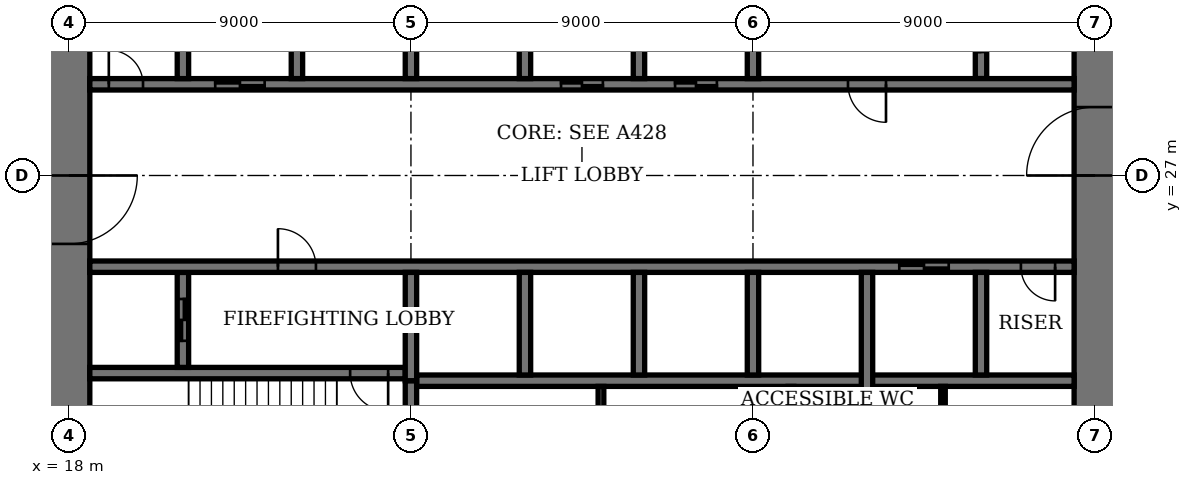
"""IFC4 building model, lengths in metres.
Left out: names, types, materials, properties, quantities, classifications, styles, units other than length and angle.
Written with IfcOpenShell. Run it as: python <this file> out.ifc"""

import sys

from ifc_helpers import new_model, si_unit, direction, frame, frame_2d, origin, place, context, subcontext, project, spatial, rectangle, extrude, element, fill, save


model = new_model("IFC4")
c1 = context("Model", 3, precision=1e-05, world=origin(), true_north=direction((0.0, 1.0)))
c2 = subcontext(c1, "Body", "Model", "MODEL_VIEW")
j1 = project(units=[si_unit("LENGTHUNIT", "METRE"), si_unit("PLANEANGLEUNIT", "RADIAN")], contexts=[c1])
p1 = place(None, origin())
s1 = spatial("IfcSite", under=j1, at=p1, CompositionType="ELEMENT")
p2 = place(p1, origin())
s2 = spatial("IfcBuilding", under=s1, at=p2, CompositionType="ELEMENT")
p3 = place(p2, frame((0.0, 0.0, 149.0)))
s3 = spatial("IfcBuildingStorey", under=s2, at=p3, CompositionType="ELEMENT", Elevation=149.0)
p4 = place(p3, frame((18.0, 35.45, 0.0), z_axis=(0.0, 0.0, 1.0), x_axis=(0.0, -1.0, 0.0)))
e1 = element("IfcWall", 1, at=p4, inside=s3, PredefinedType="SHEAR", context=c2, shape_type="SweptSolid", body=[
    extrude(rectangle(XDim=16.9, YDim=1.1, at=frame_2d((8.45, 0.0))), origin(), (0.0, 0.0, 1.0), 4.0),
])
p5 = place(p4, frame((8.45, 0.0, 0.0)))
e2 = element("IfcOpeningElement", 2, at=p5, cuts=e1, PredefinedType="OPENING", context=c2, shape_type="SweptSolid", body=[
    extrude(rectangle(XDim=1.8, YDim=2.4, at=frame_2d((0.9, 1.2))), frame((0.0, 0.56, 0.0), z_axis=(0.0, -1.0, 0.0), x_axis=(1.0, 0.0, 0.0)), (0.0, 0.0, 1.0), 1.12),
])
p6 = place(p3, frame((45.0, 18.55, 0.0), z_axis=(0.0, 0.0, 1.0), x_axis=(0.0, 1.0, 0.0)))
e3 = element("IfcWall", 3, at=p6, inside=s3, PredefinedType="SHEAR", context=c2, shape_type="SweptSolid", body=[
    extrude(rectangle(XDim=16.9, YDim=1.1, at=frame_2d((8.45, 0.0))), origin(), (0.0, 0.0, 1.0), 4.0),
])
p7 = place(p6, frame((8.45, 0.0, 0.0)))
e4 = element("IfcOpeningElement", 4, at=p7, cuts=e3, PredefinedType="OPENING", context=c2, shape_type="SweptSolid", body=[
    extrude(rectangle(XDim=1.8, YDim=2.4, at=frame_2d((0.9, 1.2))), frame((0.0, 0.56, 0.0), z_axis=(0.0, -1.0, 0.0), x_axis=(1.0, 0.0, 0.0)), (0.0, 0.0, 1.0), 1.12),
])
p8 = place(p3, frame((18.55, 21.8, 0.0), z_axis=(0.0, 0.0, 1.0), x_axis=(1.0, 0.0, 0.0)))
e5 = element("IfcWall", 5, at=p8, inside=s3, PredefinedType="SHEAR", context=c2, shape_type="SweptSolid", body=[
    extrude(rectangle(XDim=8.3, YDim=0.3, at=frame_2d((4.15, 0.0))), origin(), (0.0, 0.0, 1.0), 4.0),
])
p9 = place(p8, frame((6.85, 0.0, 0.0)))
e6 = element("IfcOpeningElement", 6, at=p9, cuts=e5, PredefinedType="OPENING", context=c2, shape_type="SweptSolid", body=[
    extrude(rectangle(XDim=1.0, YDim=2.4, at=frame_2d((0.5, 1.2))), frame((0.0, 0.16, 0.0), z_axis=(0.0, -1.0, 0.0), x_axis=(1.0, 0.0, 0.0)), (0.0, 0.0, 1.0), 0.32),
])
p10 = place(p3, frame((27.0, 18.55, 0.0), z_axis=(0.0, 0.0, 1.0), x_axis=(0.0, 1.0, 0.0)))
e7 = element("IfcWall", 7, at=p10, inside=s3, PredefinedType="SHEAR", context=c2, shape_type="SweptSolid", body=[
    extrude(rectangle(XDim=3.05, YDim=0.3, at=frame_2d((1.525, 0.0))), origin(), (0.0, 0.0, 1.0), 4.0),
])
p11 = place(p3, frame((21.0, 21.95, 0.0), z_axis=(0.0, 0.0, 1.0), x_axis=(0.0, 1.0, 0.0)))
e8 = element("IfcWall", 8, at=p11, inside=s3, PredefinedType="SHEAR", context=c2, shape_type="SweptSolid", body=[
    extrude(rectangle(XDim=2.5, YDim=0.3, at=frame_2d((1.25, 0.0))), origin(), (0.0, 0.0, 1.0), 4.0),
])
p12 = place(p11, frame((0.7, 0.0, 0.0)))
e9 = element("IfcOpeningElement", 9, at=p12, cuts=e8, PredefinedType="OPENING", context=c2, shape_type="SweptSolid", body=[
    extrude(rectangle(XDim=1.1, YDim=2.4, at=frame_2d((0.55, 1.2))), frame((0.0, 0.16, 0.0), z_axis=(0.0, -1.0, 0.0), x_axis=(1.0, 0.0, 0.0)), (0.0, 0.0, 1.0), 0.32),
])
p13 = place(p3, frame((42.0, 29.55, 0.0), z_axis=(0.0, 0.0, 1.0), x_axis=(0.0, 1.0, 0.0)))
e10 = element("IfcWall", 10, at=p13, inside=s3, PredefinedType="SHEAR", context=c2, shape_type="SweptSolid", body=[
    extrude(rectangle(XDim=2.5, YDim=0.3, at=frame_2d((1.25, 0.0))), origin(), (0.0, 0.0, 1.0), 4.0),
])
p14 = place(p13, frame((0.7, 0.0, 0.0)))
e11 = element("IfcOpeningElement", 11, at=p14, cuts=e10, PredefinedType="OPENING", context=c2, shape_type="SweptSolid", body=[
    extrude(rectangle(XDim=1.1, YDim=2.4, at=frame_2d((0.55, 1.2))), frame((0.0, 0.16, 0.0), z_axis=(0.0, -1.0, 0.0), x_axis=(1.0, 0.0, 0.0)), (0.0, 0.0, 1.0), 0.32),
])
p15 = place(p3, frame((18.55, 24.6, 0.0), z_axis=(0.0, 0.0, 1.0), x_axis=(1.0, 0.0, 0.0)))
e12 = element("IfcWall", 12, at=p15, inside=s3, PredefinedType="SHEAR", context=c2, shape_type="SweptSolid", body=[
    extrude(rectangle(XDim=25.9, YDim=0.3, at=frame_2d((12.95, 0.0))), origin(), (0.0, 0.0, 1.0), 4.0),
])
p16 = place(p15, frame((4.95, 0.0, 0.0)))
e13 = element("IfcOpeningElement", 13, at=p16, cuts=e12, PredefinedType="OPENING", context=c2, shape_type="SweptSolid", body=[
    extrude(rectangle(XDim=1.0, YDim=2.4, at=frame_2d((0.5, 1.2))), frame((0.0, 0.16, 0.0), z_axis=(0.0, -1.0, 0.0), x_axis=(1.0, 0.0, 0.0)), (0.0, 0.0, 1.0), 0.32),
])
p17 = place(p15, frame((24.5, 0.0, 0.0)))
e14 = element("IfcOpeningElement", 14, at=p17, cuts=e12, PredefinedType="OPENING", context=c2, shape_type="SweptSolid", body=[
    extrude(rectangle(XDim=0.9, YDim=2.1, at=frame_2d((0.45, 1.05))), frame((0.0, 0.16, 0.0), z_axis=(0.0, -1.0, 0.0), x_axis=(1.0, 0.0, 0.0)), (0.0, 0.0, 1.0), 0.32),
])
p18 = place(p15, frame((21.3, 0.0, 0.0)))
e15 = element("IfcOpeningElement", 15, at=p18, cuts=e12, PredefinedType="OPENING", context=c2, shape_type="SweptSolid", body=[
    extrude(rectangle(XDim=1.3, YDim=2.4, at=frame_2d((0.65, 1.2))), frame((0.0, 0.16, 0.0), z_axis=(0.0, -1.0, 0.0), x_axis=(1.0, 0.0, 0.0)), (0.0, 0.0, 1.0), 0.32),
])
p19 = place(p3, frame((18.55, 29.4, 0.0), z_axis=(0.0, 0.0, 1.0), x_axis=(1.0, 0.0, 0.0)))
e16 = element("IfcWall", 16, at=p19, inside=s3, PredefinedType="SHEAR", context=c2, shape_type="SweptSolid", body=[
    extrude(rectangle(XDim=25.9, YDim=0.3, at=frame_2d((12.95, 0.0))), origin(), (0.0, 0.0, 1.0), 4.0),
])
p20 = place(p19, frame((19.95, 0.0, 0.0)))
e17 = element("IfcOpeningElement", 17, at=p20, cuts=e16, PredefinedType="OPENING", context=c2, shape_type="SweptSolid", body=[
    extrude(rectangle(XDim=1.0, YDim=2.4, at=frame_2d((0.5, 1.2))), frame((0.0, 0.16, 0.0), z_axis=(0.0, -1.0, 0.0), x_axis=(1.0, 0.0, 0.0)), (0.0, 0.0, 1.0), 0.32),
])
p21 = place(p19, frame((0.5, 0.0, 0.0)))
e18 = element("IfcOpeningElement", 18, at=p21, cuts=e16, PredefinedType="OPENING", context=c2, shape_type="SweptSolid", body=[
    extrude(rectangle(XDim=0.9, YDim=2.1, at=frame_2d((0.45, 1.05))), frame((0.0, 0.16, 0.0), z_axis=(0.0, -1.0, 0.0), x_axis=(1.0, 0.0, 0.0)), (0.0, 0.0, 1.0), 0.32),
])
p22 = place(p19, frame((15.4, 0.0, 0.0)))
e19 = element("IfcOpeningElement", 19, at=p22, cuts=e16, PredefinedType="OPENING", context=c2, shape_type="SweptSolid", body=[
    extrude(rectangle(XDim=1.1, YDim=2.4, at=frame_2d((0.55, 1.2))), frame((0.0, 0.16, 0.0), z_axis=(0.0, -1.0, 0.0), x_axis=(1.0, 0.0, 0.0)), (0.0, 0.0, 1.0), 0.32),
])
p23 = place(p19, frame((12.4, 0.0, 0.0)))
e20 = element("IfcOpeningElement", 20, at=p23, cuts=e16, PredefinedType="OPENING", context=c2, shape_type="SweptSolid", body=[
    extrude(rectangle(XDim=1.1, YDim=2.4, at=frame_2d((0.55, 1.2))), frame((0.0, 0.16, 0.0), z_axis=(0.0, -1.0, 0.0), x_axis=(1.0, 0.0, 0.0)), (0.0, 0.0, 1.0), 0.32),
])
p24 = place(p19, frame((3.3, 0.0, 0.0)))
e21 = element("IfcOpeningElement", 21, at=p24, cuts=e16, PredefinedType="OPENING", context=c2, shape_type="SweptSolid", body=[
    extrude(rectangle(XDim=1.3, YDim=2.4, at=frame_2d((0.65, 1.2))), frame((0.0, 0.16, 0.0), z_axis=(0.0, -1.0, 0.0), x_axis=(1.0, 0.0, 0.0)), (0.0, 0.0, 1.0), 0.32),
])
p25 = place(p3, frame((27.15, 21.6, 0.0), z_axis=(0.0, 0.0, 1.0), x_axis=(1.0, 0.0, 0.0)))
e22 = element("IfcWall", 22, at=p25, inside=s3, PredefinedType="SHEAR", context=c2, shape_type="SweptSolid", body=[
    extrude(rectangle(XDim=17.3, YDim=0.3, at=frame_2d((8.65, 0.0))), origin(), (0.0, 0.0, 1.0), 4.0),
])
for number, where, z_axis, x_axis in (
    (23, (30.0, 21.75, 0.0), (0.0, 0.0, 1.0), (0.0, 1.0, 0.0)),
    (24, (33.0, 29.55, 0.0), (0.0, 0.0, 1.0), (0.0, 1.0, 0.0)),
    (25, (33.0, 21.75, 0.0), (0.0, 0.0, 1.0), (0.0, 1.0, 0.0)),
    (26, (30.0, 29.55, 0.0), (0.0, 0.0, 1.0), (0.0, 1.0, 0.0)),
    (27, (36.0, 21.75, 0.0), (0.0, 0.0, 1.0), (0.0, 1.0, 0.0)),
    (28, (27.0, 29.55, 0.0), (0.0, 0.0, 1.0), (0.0, 1.0, 0.0)),
):
    element("IfcWall", number, at=place(p3, frame(where, z_axis=z_axis, x_axis=x_axis)), inside=s3, PredefinedType="SHEAR", context=c2, shape_type="SweptSolid", body=[
        extrude(rectangle(XDim=2.7, YDim=0.3, at=frame_2d((1.35, 0.0))), origin(), (0.0, 0.0, 1.0), 4.0),
    ])
for number, where, z_axis, x_axis in (
    (29, (39.0, 18.55, 0.0), (0.0, 0.0, 1.0), (0.0, 1.0, 0.0)),
    (30, (24.0, 29.55, 0.0), (0.0, 0.0, 1.0), (0.0, 1.0, 0.0)),
):
    element("IfcWall", number, at=place(p3, frame(where, z_axis=z_axis, x_axis=x_axis)), inside=s3, PredefinedType="SHEAR", context=c2, shape_type="SweptSolid", body=[
        extrude(rectangle(XDim=5.9, YDim=0.3, at=frame_2d((2.95, 0.0))), origin(), (0.0, 0.0, 1.0), 4.0),
    ])
for number, where, z_axis, x_axis in (
    (31, (42.0, 21.75, 0.0), (0.0, 0.0, 1.0), (0.0, 1.0, 0.0)),
    (32, (21.0, 29.55, 0.0), (0.0, 0.0, 1.0), (0.0, 1.0, 0.0)),
):
    element("IfcWall", number, at=place(p3, frame(where, z_axis=z_axis, x_axis=x_axis)), inside=s3, PredefinedType="SHEAR", context=c2, shape_type="SweptSolid", body=[
        extrude(rectangle(XDim=2.7, YDim=0.3, at=frame_2d((1.35, 0.0))), origin(), (0.0, 0.0, 1.0), 4.0),
    ])
for number, where, z_axis, x_axis in (
    (33, (27.0, 21.6, 0.0), (0.0, 0.0, 1.0), (0.0, 1.0, 0.0)),
    (34, (36.0, 29.55, 0.0), (0.0, 0.0, 1.0), (0.0, 1.0, 0.0)),
):
    element("IfcWall", number, at=place(p3, frame(where, z_axis=z_axis, x_axis=x_axis)), inside=s3, PredefinedType="SHEAR", context=c2, shape_type="SweptSolid", body=[
        extrude(rectangle(XDim=2.85, YDim=0.3, at=frame_2d((1.425, 0.0))), origin(), (0.0, 0.0, 1.0), 4.0),
    ])
for number, where, z_axis, x_axis in (
    (35, (32.0, 18.55, 0.0), (0.0, 0.0, 1.0), (0.0, 1.0, 0.0)),
    (36, (37.0, 18.55, 0.0), (0.0, 0.0, 1.0), (0.0, 1.0, 0.0)),
):
    element("IfcWall", number, at=place(p3, frame(where, z_axis=z_axis, x_axis=x_axis)), inside=s3, PredefinedType="PARTITIONING", context=c2, shape_type="SweptSolid", body=[
        extrude(rectangle(XDim=2.9, YDim=0.15, at=frame_2d((1.45, 0.0))), origin(), (0.0, 0.0, 1.0), 3.75),
    ])
p26 = place(p3, frame((41.0, 18.55, 0.0), z_axis=(0.0, 0.0, 1.0), x_axis=(0.0, 1.0, 0.0)))
e37 = element("IfcWall", 37, at=p26, inside=s3, PredefinedType="PARTITIONING", context=c2, shape_type="SweptSolid", body=[
    extrude(rectangle(XDim=2.9, YDim=0.12, at=frame_2d((1.45, 0.0))), origin(), (0.0, 0.0, 1.0), 3.75),
])
p27 = place(p26, frame((0.95, 0.0, 0.0)))
e38 = element("IfcOpeningElement", 38, at=p27, cuts=e37, PredefinedType="OPENING", context=c2, shape_type="SweptSolid", body=[
    extrude(rectangle(XDim=1.0, YDim=2.4, at=frame_2d((0.5, 1.2))), frame((0.0, 0.07, 0.0), z_axis=(0.0, -1.0, 0.0), x_axis=(1.0, 0.0, 0.0)), (0.0, 0.0, 1.0), 0.14),
])
p28 = place(p5, origin())
e39 = element("IfcDoor", 39, at=p28, inside=s3, OperationType="DOUBLE_DOOR_DOUBLE_SWING", PredefinedType="DOOR", context=c2, shape_type="SweptSolid", body=[
    extrude(rectangle(XDim=1.8, YDim=2.4, at=frame_2d((0.9, 1.2))), frame((0.0, 0.03, 0.0), z_axis=(0.0, -1.0, 0.0), x_axis=(1.0, 0.0, 0.0)), (0.0, 0.0, 1.0), 0.06),
    extrude(rectangle(XDim=0.04, YDim=2.4, at=frame_2d((0.02, 1.2))), frame((0.0, 0.55, 0.0), z_axis=(0.0, -1.0, 0.0), x_axis=(1.0, 0.0, 0.0)), (0.0, 0.0, 1.0), 1.1),
    extrude(rectangle(XDim=0.04, YDim=2.4, at=frame_2d((1.78, 1.2))), frame((0.0, 0.55, 0.0), z_axis=(0.0, -1.0, 0.0), x_axis=(1.0, 0.0, 0.0)), (0.0, 0.0, 1.0), 1.1),
    extrude(rectangle(XDim=1.8, YDim=0.04, at=frame_2d((0.9, 2.38))), frame((0.0, 0.55, 0.0), z_axis=(0.0, -1.0, 0.0), x_axis=(1.0, 0.0, 0.0)), (0.0, 0.0, 1.0), 1.1),
])
fill(e2, e39)
p29 = place(p7, origin())
e40 = element("IfcDoor", 40, at=p29, inside=s3, OperationType="DOUBLE_DOOR_DOUBLE_SWING", PredefinedType="DOOR", context=c2, shape_type="SweptSolid", body=[
    extrude(rectangle(XDim=1.8, YDim=2.4, at=frame_2d((0.9, 1.2))), frame((0.0, 0.03, 0.0), z_axis=(0.0, -1.0, 0.0), x_axis=(1.0, 0.0, 0.0)), (0.0, 0.0, 1.0), 0.06),
    extrude(rectangle(XDim=0.04, YDim=2.4, at=frame_2d((0.02, 1.2))), frame((0.0, 0.55, 0.0), z_axis=(0.0, -1.0, 0.0), x_axis=(1.0, 0.0, 0.0)), (0.0, 0.0, 1.0), 1.1),
    extrude(rectangle(XDim=0.04, YDim=2.4, at=frame_2d((1.78, 1.2))), frame((0.0, 0.55, 0.0), z_axis=(0.0, -1.0, 0.0), x_axis=(1.0, 0.0, 0.0)), (0.0, 0.0, 1.0), 1.1),
    extrude(rectangle(XDim=1.8, YDim=0.04, at=frame_2d((0.9, 2.38))), frame((0.0, 0.55, 0.0), z_axis=(0.0, -1.0, 0.0), x_axis=(1.0, 0.0, 0.0)), (0.0, 0.0, 1.0), 1.1),
])
fill(e4, e40)
p30 = place(p9, origin())
e41 = element("IfcDoor", 41, at=p30, inside=s3, OperationType="SINGLE_SWING_RIGHT", PredefinedType="DOOR", context=c2, shape_type="SweptSolid", body=[
    extrude(rectangle(XDim=1.0, YDim=2.4, at=frame_2d((0.5, 1.2))), frame((0.0, 0.03, 0.0), z_axis=(0.0, -1.0, 0.0), x_axis=(1.0, 0.0, 0.0)), (0.0, 0.0, 1.0), 0.06),
])
fill(e6, e41)
p31 = place(p16, origin())
e42 = element("IfcDoor", 42, at=p31, inside=s3, OperationType="SINGLE_SWING_RIGHT", PredefinedType="DOOR", context=c2, shape_type="SweptSolid", body=[
    extrude(rectangle(XDim=1.0, YDim=2.4, at=frame_2d((0.5, 1.2))), frame((0.0, 0.03, 0.0), z_axis=(0.0, -1.0, 0.0), x_axis=(1.0, 0.0, 0.0)), (0.0, 0.0, 1.0), 0.06),
])
fill(e13, e42)
p32 = place(p20, origin())
e43 = element("IfcDoor", 43, at=p32, inside=s3, OperationType="SINGLE_SWING_RIGHT", PredefinedType="DOOR", context=c2, shape_type="SweptSolid", body=[
    extrude(rectangle(XDim=1.0, YDim=2.4, at=frame_2d((0.5, 1.2))), frame((0.0, 0.03, 0.0), z_axis=(0.0, -1.0, 0.0), x_axis=(1.0, 0.0, 0.0)), (0.0, 0.0, 1.0), 0.06),
])
fill(e17, e43)
p33 = place(p17, origin())
e44 = element("IfcDoor", 44, at=p33, inside=s3, OperationType="SINGLE_SWING_RIGHT", PredefinedType="DOOR", context=c2, shape_type="SweptSolid", body=[
    extrude(rectangle(XDim=0.9, YDim=2.1, at=frame_2d((0.45, 1.05))), frame((0.0, 0.03, 0.0), z_axis=(0.0, -1.0, 0.0), x_axis=(1.0, 0.0, 0.0)), (0.0, 0.0, 1.0), 0.06),
])
fill(e14, e44)
p34 = place(p21, origin())
e45 = element("IfcDoor", 45, at=p34, inside=s3, OperationType="SINGLE_SWING_RIGHT", PredefinedType="DOOR", context=c2, shape_type="SweptSolid", body=[
    extrude(rectangle(XDim=0.9, YDim=2.1, at=frame_2d((0.45, 1.05))), frame((0.0, 0.03, 0.0), z_axis=(0.0, -1.0, 0.0), x_axis=(1.0, 0.0, 0.0)), (0.0, 0.0, 1.0), 0.06),
])
fill(e18, e45)
p35 = place(p22, origin())
e46 = element("IfcDoor", 46, at=p35, inside=s3, OperationType="DOUBLE_DOOR_SLIDING", PredefinedType="DOOR", context=c2, shape_type="SweptSolid", body=[
    extrude(rectangle(XDim=1.1, YDim=2.4, at=frame_2d((0.55, 1.2))), frame((0.0, 0.02, 0.0), z_axis=(0.0, -1.0, 0.0), x_axis=(1.0, 0.0, 0.0)), (0.0, 0.0, 1.0), 0.04),
])
fill(e19, e46)
p36 = place(p23, origin())
e47 = element("IfcDoor", 47, at=p36, inside=s3, OperationType="DOUBLE_DOOR_SLIDING", PredefinedType="DOOR", context=c2, shape_type="SweptSolid", body=[
    extrude(rectangle(XDim=1.1, YDim=2.4, at=frame_2d((0.55, 1.2))), frame((0.0, 0.02, 0.0), z_axis=(0.0, -1.0, 0.0), x_axis=(1.0, 0.0, 0.0)), (0.0, 0.0, 1.0), 0.04),
])
fill(e20, e47)
p37 = place(p18, origin())
e48 = element("IfcDoor", 48, at=p37, inside=s3, OperationType="DOUBLE_DOOR_SLIDING", PredefinedType="DOOR", context=c2, shape_type="SweptSolid", body=[
    extrude(rectangle(XDim=1.3, YDim=2.4, at=frame_2d((0.65, 1.2))), frame((0.0, 0.02, 0.0), z_axis=(0.0, -1.0, 0.0), x_axis=(1.0, 0.0, 0.0)), (0.0, 0.0, 1.0), 0.04),
])
fill(e15, e48)
p38 = place(p24, origin())
e49 = element("IfcDoor", 49, at=p38, inside=s3, OperationType="DOUBLE_DOOR_SLIDING", PredefinedType="DOOR", context=c2, shape_type="SweptSolid", body=[
    extrude(rectangle(XDim=1.3, YDim=2.4, at=frame_2d((0.65, 1.2))), frame((0.0, 0.02, 0.0), z_axis=(0.0, -1.0, 0.0), x_axis=(1.0, 0.0, 0.0)), (0.0, 0.0, 1.0), 0.04),
])
fill(e21, e49)
p39 = place(p12, origin())
e50 = element("IfcDoor", 50, at=p39, inside=s3, OperationType="DOUBLE_DOOR_SLIDING", PredefinedType="DOOR", context=c2, shape_type="SweptSolid", body=[
    extrude(rectangle(XDim=1.1, YDim=2.4, at=frame_2d((0.55, 1.2))), frame((0.0, 0.03, 0.0), z_axis=(0.0, -1.0, 0.0), x_axis=(1.0, 0.0, 0.0)), (0.0, 0.0, 1.0), 0.06),
])
fill(e9, e50)
save(model, sys.argv[1])
